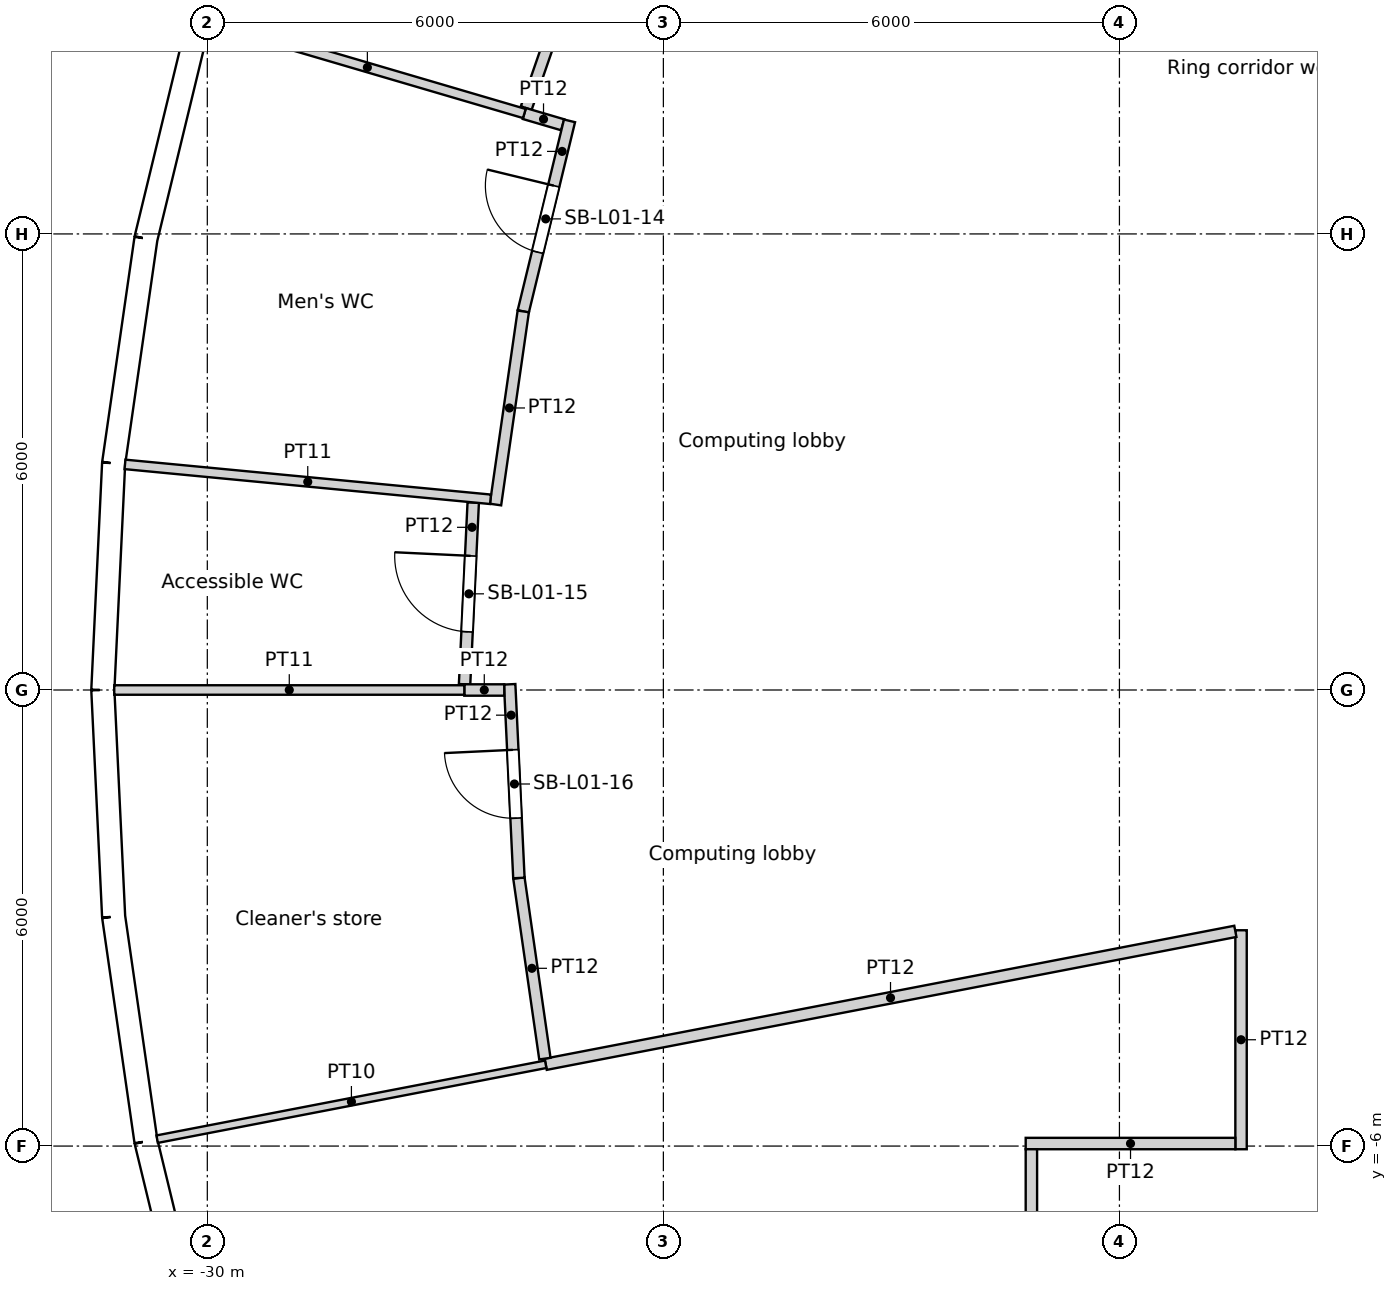
"""IFC4 building model, lengths in metres.
Left out: names, types, materials, properties, quantities, classifications, styles, units other than length and angle.
Written with IfcOpenShell. Run it as: python <this file> out.ifc"""

import sys

from ifc_helpers import new_model, si_unit, direction, frame, frame_2d, origin, origin_2d, place, context, subcontext, project, spatial, rectangle, circle, extrude, element, fill, save


model = new_model("IFC4")
c1 = context("Model", 3, precision=1e-05, world=origin(), true_north=direction((0.0, 1.0)))
c2 = subcontext(c1, "Body", "Model", "MODEL_VIEW")
j1 = project(units=[si_unit("LENGTHUNIT", "METRE"), si_unit("PLANEANGLEUNIT", "RADIAN")], contexts=[c1])
p1 = place(None, origin())
s1 = spatial("IfcSite", under=j1, at=p1, CompositionType="ELEMENT")
p2 = place(p1, origin())
s2 = spatial("IfcBuilding", under=s1, at=p2, CompositionType="ELEMENT")
p3 = place(p2, frame((0.0, 0.0, 9.0)))
s3 = spatial("IfcBuildingStorey", under=s2, at=p3, CompositionType="ELEMENT", Elevation=9.0)
for number, where, z_axis, x_axis in (
    (1, (-29.048, 8.529, 0.0), (0.0, 0.0, 1.0), (1.0, 0.0, 0.0)),
    (2, (-30.137, 2.878, 0.0), (0.0, 0.0, 1.0), (1.0, 0.0, 0.0)),
    (3, (-30.137, -2.878, 0.0), (0.0, 0.0, 1.0), (1.0, 0.0, 0.0)),
):
    element("IfcColumn", number, at=place(p3, frame(where, z_axis=z_axis, x_axis=x_axis)), inside=s3, PredefinedType="COLUMN", context=c2, shape_type="SweptSolid", body=[
        extrude(circle(Radius=0.7, at=origin_2d()), origin(), (0.0, 0.0, 1.0), 4.8),
    ])
for number, where, z_axis, x_axis in (
    (4, (-23.067, 8.396, 0.0), (0.0, 0.0, 1.0), (1.0, 0.0, 0.0)),
    (5, (-24.382, 2.85, 0.0), (0.0, 0.0, 1.0), (1.0, 0.0, 0.0)),
    (6, (-24.382, -2.85, 0.0), (0.0, 0.0, 1.0), (1.0, 0.0, 0.0)),
):
    element("IfcColumn", number, at=place(p3, frame(where, z_axis=z_axis, x_axis=x_axis)), inside=s3, PredefinedType="COLUMN", context=c2, shape_type="SweptSolid", body=[
        extrude(circle(Radius=0.75, at=origin_2d()), origin(), (0.0, 0.0, 1.0), 4.8),
    ])
for number, where, z_axis, x_axis in (
    (7, (-16.958, 8.167, 0.0), (0.0, 0.0, 1.0), (1.0, 0.0, 0.0)),
    (8, (-18.612, 2.805, 0.0), (0.0, 0.0, 1.0), (1.0, 0.0, 0.0)),
    (9, (-18.612, -2.805, 0.0), (0.0, 0.0, 1.0), (1.0, 0.0, 0.0)),
):
    element("IfcColumn", number, at=place(p3, frame(where, z_axis=z_axis, x_axis=x_axis)), inside=s3, PredefinedType="COLUMN", context=c2, shape_type="SweptSolid", body=[
        extrude(circle(Radius=0.8, at=origin_2d()), origin(), (0.0, 0.0, 1.0), 4.8),
    ])
p4 = place(p3, frame((-30.104, 8.839, 0.0), z_axis=(0.0, 0.0, 1.0), x_axis=(-0.235756834479, -0.971812078026, 0.0)))
e10 = element("IfcWall", 10, at=p4, inside=s3, PredefinedType="SOLIDWALL", context=c2, shape_type="SweptSolid", body=[
    extrude(rectangle(XDim=2.986, YDim=0.3, at=frame_2d((1.493, 0.0))), origin(), (0.0, 0.0, 1.0), 4.35),
])
p5 = place(p4, frame((1.493, 0.0, 2.0)))
e11 = element("IfcOpeningElement", 11, at=p5, cuts=e10, PredefinedType="OPENING", context=c2, shape_type="SweptSolid", body=[
    extrude(circle(Radius=1.2, at=origin_2d()), frame((0.0, 0.16, 0.0), z_axis=(0.0, -1.0, 0.0), x_axis=(1.0, 0.0, 0.0)), (0.0, 0.0, 1.0), 0.32),
])
p6 = place(p3, frame((-30.807, 5.938, 0.0), z_axis=(0.0, 0.0, 1.0), x_axis=(-0.142360001917, -0.989814947278, 0.0)))
e12 = element("IfcWall", 12, at=p6, inside=s3, PredefinedType="SOLIDWALL", context=c2, shape_type="SweptSolid", body=[
    extrude(rectangle(XDim=2.986, YDim=0.3, at=frame_2d((1.493, 0.0))), origin(), (0.0, 0.0, 1.0), 4.35),
])
p7 = place(p6, frame((1.493, 0.0, 2.0)))
e13 = element("IfcOpeningElement", 13, at=p7, cuts=e12, PredefinedType="OPENING", context=c2, shape_type="SweptSolid", body=[
    extrude(circle(Radius=1.2, at=origin_2d()), frame((0.0, 0.16, 0.0), z_axis=(0.0, -1.0, 0.0), x_axis=(1.0, 0.0, 0.0)), (0.0, 0.0, 1.0), 0.32),
])
p8 = place(p3, frame((-31.232, 2.982, 0.0), z_axis=(0.0, 0.0, 1.0), x_axis=(-0.047588458579, -0.998867027492, 0.0)))
e14 = element("IfcWall", 14, at=p8, inside=s3, PredefinedType="SOLIDWALL", context=c2, shape_type="SweptSolid", body=[
    extrude(rectangle(XDim=2.986, YDim=0.3, at=frame_2d((1.493, 0.0))), origin(), (0.0, 0.0, 1.0), 4.35),
])
p9 = place(p8, frame((1.493, 0.0, 2.0)))
e15 = element("IfcOpeningElement", 15, at=p9, cuts=e14, PredefinedType="OPENING", context=c2, shape_type="SweptSolid", body=[
    extrude(circle(Radius=1.2, at=origin_2d()), frame((0.0, 0.16, 0.0), z_axis=(0.0, -1.0, 0.0), x_axis=(1.0, 0.0, 0.0)), (0.0, 0.0, 1.0), 0.32),
])
p10 = place(p3, frame((-31.375, 0.0, 0.0), z_axis=(0.0, 0.0, 1.0), x_axis=(0.047588458579, -0.998867027492, 0.0)))
e16 = element("IfcWall", 16, at=p10, inside=s3, PredefinedType="SOLIDWALL", context=c2, shape_type="SweptSolid", body=[
    extrude(rectangle(XDim=2.986, YDim=0.3, at=frame_2d((1.493, 0.0))), origin(), (0.0, 0.0, 1.0), 4.35),
])
p11 = place(p10, frame((1.493, 0.0, 2.0)))
e17 = element("IfcOpeningElement", 17, at=p11, cuts=e16, PredefinedType="OPENING", context=c2, shape_type="SweptSolid", body=[
    extrude(circle(Radius=1.2, at=origin_2d()), frame((0.0, 0.16, 0.0), z_axis=(0.0, -1.0, 0.0), x_axis=(1.0, 0.0, 0.0)), (0.0, 0.0, 1.0), 0.32),
])
p12 = place(p3, frame((-31.232, -2.982, 0.0), z_axis=(0.0, 0.0, 1.0), x_axis=(0.142360001917, -0.989814947278, 0.0)))
e18 = element("IfcWall", 18, at=p12, inside=s3, PredefinedType="SOLIDWALL", context=c2, shape_type="SweptSolid", body=[
    extrude(rectangle(XDim=2.986, YDim=0.3, at=frame_2d((1.493, 0.0))), origin(), (0.0, 0.0, 1.0), 4.35),
])
p13 = place(p12, frame((1.493, 0.0, 2.0)))
e19 = element("IfcOpeningElement", 19, at=p13, cuts=e18, PredefinedType="OPENING", context=c2, shape_type="SweptSolid", body=[
    extrude(circle(Radius=1.2, at=origin_2d()), frame((0.0, 0.16, 0.0), z_axis=(0.0, -1.0, 0.0), x_axis=(1.0, 0.0, 0.0)), (0.0, 0.0, 1.0), 0.32),
])
p14 = place(p3, frame((-30.807, -5.938, 0.0), z_axis=(0.0, 0.0, 1.0), x_axis=(0.235756834479, -0.971812078026, 0.0)))
e20 = element("IfcWall", 20, at=p14, inside=s3, PredefinedType="SOLIDWALL", context=c2, shape_type="SweptSolid", body=[
    extrude(rectangle(XDim=2.986, YDim=0.3, at=frame_2d((1.493, 0.0))), origin(), (0.0, 0.0, 1.0), 4.35),
])
p15 = place(p14, frame((1.493, 0.0, 2.0)))
e21 = element("IfcOpeningElement", 21, at=p15, cuts=e20, PredefinedType="OPENING", context=c2, shape_type="SweptSolid", body=[
    extrude(circle(Radius=1.2, at=origin_2d()), frame((0.0, 0.16, 0.0), z_axis=(0.0, -1.0, 0.0), x_axis=(1.0, 0.0, 0.0)), (0.0, 0.0, 1.0), 0.32),
])
p16 = place(p3, frame((-31.224, 0.0, 0.0), z_axis=(0.0, 0.0, 1.0), x_axis=(1.0, 0.0, 0.0)))
e22 = element("IfcWall", 22, at=p16, inside=s3, PredefinedType="PARTITIONING", context=c2, shape_type="SweptSolid", body=[
    extrude(rectangle(XDim=4.605, YDim=0.125, at=frame_2d((2.303, 0.0))), origin(), (0.0, 0.0, 1.0), 3.75),
])
p17 = place(p3, frame((-31.083, 2.968, 0.0), z_axis=(0.0, 0.0, 1.0), x_axis=(0.995471135627, -0.095064284212, 0.0)))
e23 = element("IfcWall", 23, at=p17, inside=s3, PredefinedType="PARTITIONING", context=c2, shape_type="SweptSolid", body=[
    extrude(rectangle(XDim=4.831, YDim=0.125, at=frame_2d((2.416, 0.0))), origin(), (0.0, 0.0, 1.0), 3.75),
])
p18 = place(p3, frame((-30.66, -5.909, 0.0), z_axis=(0.0, 0.0, 1.0), x_axis=(0.981932782009, 0.189230049451, 0.0)))
e24 = element("IfcWall", 24, at=p18, inside=s3, PredefinedType="PARTITIONING", context=c2, shape_type="SweptSolid", body=[
    extrude(rectangle(XDim=5.206, YDim=0.1, at=frame_2d((2.603, 0.0))), origin(), (0.0, 0.0, 1.0), 3.75),
])
p19 = place(p3, frame((-29.959, 8.797, 0.0), z_axis=(0.0, 0.0, 1.0), x_axis=(0.959486427162, -0.281754851054, 0.0)))
e25 = element("IfcWall", 25, at=p19, inside=s3, PredefinedType="PARTITIONING", context=c2, shape_type="SweptSolid", body=[
    extrude(rectangle(XDim=4.305, YDim=0.125, at=frame_2d((2.152, 0.0))), origin(), (0.0, 0.0, 1.0), 3.75),
])
p20 = place(p3, frame((-26.619, 0.0, 0.0), z_axis=(0.0, 0.0, 1.0), x_axis=(1.0, 0.0, 0.0)))
e26 = element("IfcWall", 26, at=p20, inside=s3, PredefinedType="PARTITIONING", context=c2, shape_type="SweptSolid", body=[
    extrude(rectangle(XDim=0.525, YDim=0.15, at=frame_2d((0.263, 0.0))), origin(), (0.0, 0.0, 1.0), 3.75),
])
p21 = place(p3, frame((-26.615, 0.075, 0.0), z_axis=(0.0, 0.0, 1.0), x_axis=(0.047526384729, 0.998869982908, 0.0)))
e27 = element("IfcWall", 27, at=p21, inside=s3, PredefinedType="PARTITIONING", context=c2, shape_type="SweptSolid", body=[
    extrude(rectangle(XDim=2.394, YDim=0.15, at=frame_2d((1.197, 0.0))), origin(), (0.0, 0.0, 1.0), 3.75),
])
p22 = place(p21, frame((0.691, 0.0, 0.0)))
e28 = element("IfcOpeningElement", 28, at=p22, cuts=e27, PredefinedType="OPENING", context=c2, shape_type="SweptSolid", body=[
    extrude(rectangle(XDim=1.0, YDim=2.1, at=frame_2d((0.5, 1.05))), frame((0.0, 0.075, 0.0), z_axis=(0.0, -1.0, 0.0), x_axis=(1.0, 0.0, 0.0)), (0.0, 0.0, 1.0), 0.15),
])
p23 = place(p3, frame((-25.901, -2.473, 0.0), z_axis=(0.0, 0.0, 1.0), x_axis=(-0.047565149415, 0.998868137724, 0.0)))
e29 = element("IfcWall", 29, at=p23, inside=s3, PredefinedType="PARTITIONING", context=c2, shape_type="SweptSolid", body=[
    extrude(rectangle(XDim=2.551, YDim=0.15, at=frame_2d((1.275, 0.0))), origin(), (0.0, 0.0, 1.0), 3.75),
])
p24 = place(p23, frame((0.788, 0.0, 0.0)))
e30 = element("IfcOpeningElement", 30, at=p24, cuts=e29, PredefinedType="OPENING", context=c2, shape_type="SweptSolid", body=[
    extrude(rectangle(XDim=0.9, YDim=2.1, at=frame_2d((0.45, 1.05))), frame((0.0, 0.075, 0.0), z_axis=(0.0, -1.0, 0.0), x_axis=(1.0, 0.0, 0.0)), (0.0, 0.0, 1.0), 0.15),
])
p25 = place(p3, frame((-25.901, -2.473, 0.0), z_axis=(0.0, 0.0, 1.0), x_axis=(0.142360874309, -0.989814821806, 0.0)))
e31 = element("IfcWall", 31, at=p25, inside=s3, PredefinedType="PARTITIONING", context=c2, shape_type="SweptSolid", body=[
    extrude(rectangle(XDim=2.401, YDim=0.15, at=frame_2d((1.2, 0.0))), origin(), (0.0, 0.0, 1.0), 3.75),
])
p26 = place(p3, frame((-25.843, 4.981, 0.0), z_axis=(0.0, 0.0, 1.0), x_axis=(-0.142380000947, -0.989812070714, 0.0)))
e32 = element("IfcWall", 32, at=p26, inside=s3, PredefinedType="PARTITIONING", context=c2, shape_type="SweptSolid", body=[
    extrude(rectangle(XDim=2.567, YDim=0.15, at=frame_2d((1.283, 0.0))), origin(), (0.0, 0.0, 1.0), 3.75),
])
p27 = place(p3, frame((-25.829, 7.584, 0.0), z_axis=(0.0, 0.0, 1.0), x_axis=(0.959446805351, -0.281889743876, 0.0)))
e33 = element("IfcWall", 33, at=p27, inside=s3, PredefinedType="PARTITIONING", context=c2, shape_type="SweptSolid", body=[
    extrude(rectangle(XDim=0.526, YDim=0.15, at=frame_2d((0.263, 0.0))), origin(), (0.0, 0.0, 1.0), 3.75),
])
p28 = place(p3, frame((-25.548, -4.924, 0.0), z_axis=(0.0, 0.0, 1.0), x_axis=(0.981926640708, 0.189261914468, 0.0)))
e34 = element("IfcWall", 34, at=p28, inside=s3, PredefinedType="PARTITIONING", context=c2, shape_type="SweptSolid", body=[
    extrude(rectangle(XDim=9.24, YDim=0.15, at=frame_2d((4.62, 0.0))), origin(), (0.0, 0.0, 1.0), 3.75),
])
p29 = place(p3, frame((-25.843, 4.981, 0.0), z_axis=(0.0, 0.0, 1.0), x_axis=(0.235738160544, 0.97181660804, 0.0)))
e35 = element("IfcWall", 35, at=p29, inside=s3, PredefinedType="PARTITIONING", context=c2, shape_type="SweptSolid", body=[
    extrude(rectangle(XDim=2.58, YDim=0.15, at=frame_2d((1.29, 0.0))), origin(), (0.0, 0.0, 1.0), 3.75),
])
p30 = place(p29, frame((0.802, 0.0, 0.0)))
e36 = element("IfcOpeningElement", 36, at=p30, cuts=e35, PredefinedType="OPENING", context=c2, shape_type="SweptSolid", body=[
    extrude(rectangle(XDim=0.9, YDim=2.1, at=frame_2d((0.45, 1.05))), frame((0.0, 0.075, 0.0), z_axis=(0.0, -1.0, 0.0), x_axis=(1.0, 0.0, 0.0)), (0.0, 0.0, 1.0), 0.15),
])
p31 = place(p3, frame((-24.991, 10.005, 0.0), z_axis=(0.0, 0.0, 1.0), x_axis=(-0.327046491478, -0.945008249917, 0.0)))
e37 = element("IfcWall", 37, at=p31, inside=s3, PredefinedType="PARTITIONING", context=c2, shape_type="SweptSolid", body=[
    extrude(rectangle(XDim=2.487, YDim=0.15, at=frame_2d((1.243, 0.0))), origin(), (0.0, 0.0, 1.0), 3.75),
])
p32 = place(p3, frame((-19.158, -6.042, 0.0), z_axis=(0.0, 0.0, 1.0), x_axis=(0.0, -1.0, 0.0)))
e38 = element("IfcWall", 38, at=p32, inside=s3, PredefinedType="PARTITIONING", context=c2, shape_type="SweptSolid", body=[
    extrude(rectangle(XDim=4.4, YDim=0.15, at=frame_2d((2.2, 0.0))), origin(), (0.0, 0.0, 1.0), 3.75),
])
p33 = place(p3, frame((-16.475, -5.967, 0.0), z_axis=(0.0, 0.0, 1.0), x_axis=(-1.0, 0.0, 0.0)))
e39 = element("IfcWall", 39, at=p33, inside=s3, PredefinedType="PARTITIONING", context=c2, shape_type="SweptSolid", body=[
    extrude(rectangle(XDim=2.758, YDim=0.15, at=frame_2d((1.379, 0.0))), origin(), (0.0, 0.0, 1.0), 3.75),
])
p34 = place(p3, frame((-16.4, -3.161, 0.0), z_axis=(0.0, 0.0, 1.0), x_axis=(0.0, -1.0, 0.0)))
e40 = element("IfcWall", 40, at=p34, inside=s3, PredefinedType="PARTITIONING", context=c2, shape_type="SweptSolid", body=[
    extrude(rectangle(XDim=2.881, YDim=0.15, at=frame_2d((1.44, 0.0))), origin(), (0.0, 0.0, 1.0), 3.75),
])
p35 = place(p5, origin())
e41 = element("IfcWindow", 41, at=p35, inside=s3, PartitioningType="SINGLE_PANEL", PredefinedType="WINDOW", context=c2, shape_type="SweptSolid", body=[
    extrude(circle(Radius=1.2, at=origin_2d()), frame((0.0, 0.12, 0.0), z_axis=(0.0, -1.0, 0.0), x_axis=(1.0, 0.0, 0.0)), (0.0, 0.0, 1.0), 0.1),
])
fill(e11, e41)
p36 = place(p7, origin())
e42 = element("IfcWindow", 42, at=p36, inside=s3, PartitioningType="SINGLE_PANEL", PredefinedType="WINDOW", context=c2, shape_type="SweptSolid", body=[
    extrude(circle(Radius=1.2, at=origin_2d()), frame((0.0, 0.12, 0.0), z_axis=(0.0, -1.0, 0.0), x_axis=(1.0, 0.0, 0.0)), (0.0, 0.0, 1.0), 0.1),
])
fill(e13, e42)
p37 = place(p9, origin())
e43 = element("IfcWindow", 43, at=p37, inside=s3, PartitioningType="SINGLE_PANEL", PredefinedType="WINDOW", context=c2, shape_type="SweptSolid", body=[
    extrude(circle(Radius=1.2, at=origin_2d()), frame((0.0, 0.12, 0.0), z_axis=(0.0, -1.0, 0.0), x_axis=(1.0, 0.0, 0.0)), (0.0, 0.0, 1.0), 0.1),
])
fill(e15, e43)
p38 = place(p11, origin())
e44 = element("IfcWindow", 44, at=p38, inside=s3, PartitioningType="SINGLE_PANEL", PredefinedType="WINDOW", context=c2, shape_type="SweptSolid", body=[
    extrude(circle(Radius=1.2, at=origin_2d()), frame((0.0, 0.12, 0.0), z_axis=(0.0, -1.0, 0.0), x_axis=(1.0, 0.0, 0.0)), (0.0, 0.0, 1.0), 0.1),
])
fill(e17, e44)
p39 = place(p13, origin())
e45 = element("IfcWindow", 45, at=p39, inside=s3, PartitioningType="SINGLE_PANEL", PredefinedType="WINDOW", context=c2, shape_type="SweptSolid", body=[
    extrude(circle(Radius=1.2, at=origin_2d()), frame((0.0, 0.12, 0.0), z_axis=(0.0, -1.0, 0.0), x_axis=(1.0, 0.0, 0.0)), (0.0, 0.0, 1.0), 0.1),
])
fill(e19, e45)
p40 = place(p15, origin())
e46 = element("IfcWindow", 46, at=p40, inside=s3, PartitioningType="SINGLE_PANEL", PredefinedType="WINDOW", context=c2, shape_type="SweptSolid", body=[
    extrude(circle(Radius=1.2, at=origin_2d()), frame((0.0, 0.12, 0.0), z_axis=(0.0, -1.0, 0.0), x_axis=(1.0, 0.0, 0.0)), (0.0, 0.0, 1.0), 0.1),
])
fill(e21, e46)
p41 = place(p30, origin())
e47 = element("IfcDoor", 47, at=p41, inside=s3, OperationType="SINGLE_SWING_RIGHT", PredefinedType="DOOR", context=c2, shape_type="SweptSolid", body=[
    extrude(rectangle(XDim=0.9, YDim=2.1, at=frame_2d((0.45, 1.05))), frame((0.0, 0.025, 0.0), z_axis=(0.0, -1.0, 0.0), x_axis=(1.0, 0.0, 0.0)), (0.0, 0.0, 1.0), 0.05),
])
fill(e36, e47)
p42 = place(p22, origin())
e48 = element("IfcDoor", 48, at=p42, inside=s3, OperationType="SINGLE_SWING_RIGHT", PredefinedType="DOOR", context=c2, shape_type="SweptSolid", body=[
    extrude(rectangle(XDim=1.0, YDim=2.1, at=frame_2d((0.5, 1.05))), frame((0.0, 0.025, 0.0), z_axis=(0.0, -1.0, 0.0), x_axis=(1.0, 0.0, 0.0)), (0.0, 0.0, 1.0), 0.05),
])
fill(e28, e48)
p43 = place(p24, origin())
e49 = element("IfcDoor", 49, at=p43, inside=s3, OperationType="SINGLE_SWING_RIGHT", PredefinedType="DOOR", context=c2, shape_type="SweptSolid", body=[
    extrude(rectangle(XDim=0.9, YDim=2.1, at=frame_2d((0.45, 1.05))), frame((0.0, 0.025, 0.0), z_axis=(0.0, -1.0, 0.0), x_axis=(1.0, 0.0, 0.0)), (0.0, 0.0, 1.0), 0.05),
])
fill(e30, e49)
save(model, sys.argv[1])
